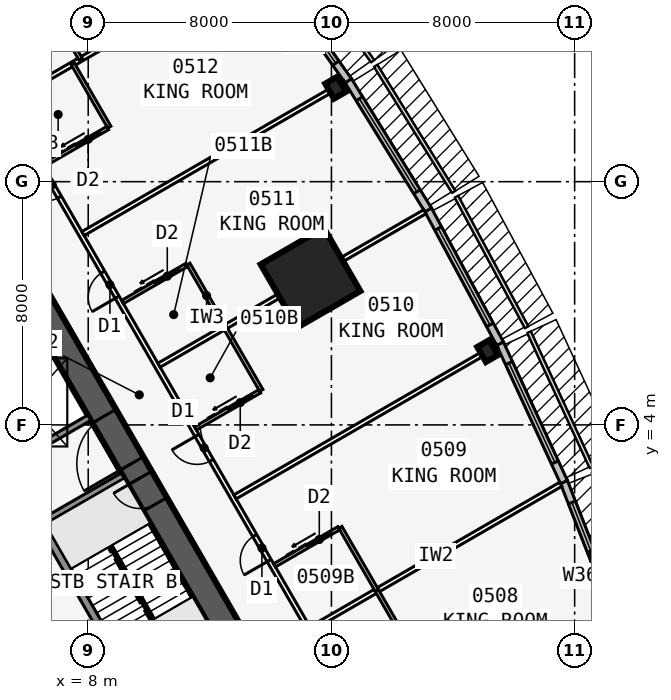
"""IFC4 building model, lengths in metres.
Left out: names, types, materials, properties, quantities, classifications, styles, units other than length and angle.
Written with IfcOpenShell. Run it as: python <this file> out.ifc"""

import sys

from ifc_helpers import new_model, si_unit, direction, frame, frame_2d, origin, origin_2d, place, context, subcontext, project, spatial, rectangle, i_section, extrude, element, fill, save


model = new_model("IFC4")
c1 = context("Model", 3, precision=1e-05, world=origin(), true_north=direction((0.0, 1.0)))
c2 = subcontext(c1, "Body", "Model", "MODEL_VIEW")
j1 = project(units=[si_unit("LENGTHUNIT", "METRE"), si_unit("PLANEANGLEUNIT", "RADIAN")], contexts=[c1])
p1 = place(None, origin())
s1 = spatial("IfcSite", under=j1, at=p1, CompositionType="ELEMENT")
p2 = place(p1, origin())
s2 = spatial("IfcBuilding", under=s1, at=p2, CompositionType="ELEMENT")
p3 = place(p2, frame((0.0, 0.0, 28.5)))
s3 = spatial("IfcBuildingStorey", under=s2, at=p3, CompositionType="ELEMENT", Elevation=28.5)
p4 = place(p3, frame((16.5, -9.526, 0.0), z_axis=(0.0, 0.0, 1.0), x_axis=(-0.499999749417, 0.866025548458, 0.0)))
e1 = element("IfcWall", 1, at=p4, inside=s3, PredefinedType="SHEAR", context=c2, shape_type="SweptSolid", body=[
    extrude(rectangle(XDim=33.0, YDim=0.9, at=frame_2d((16.5, 0.0))), origin(), (0.0, 0.0, 1.0), 3.4),
])
p5 = place(p4, frame((14.15, 0.0, 0.0)))
e2 = element("IfcOpeningElement", 2, at=p5, cuts=e1, PredefinedType="OPENING", context=c2, shape_type="SweptSolid", body=[
    extrude(rectangle(XDim=1.8, YDim=2.13, at=frame_2d((0.9, 1.065))), frame((0.0, 0.46, 0.0), z_axis=(0.0, -1.0, 0.0), x_axis=(1.0, 0.0, 0.0)), (0.0, 0.0, 1.0), 0.92),
])
p6 = place(p4, frame((12.6, 0.0, 0.0)))
e3 = element("IfcOpeningElement", 3, at=p6, cuts=e1, PredefinedType="OPENING", context=c2, shape_type="SweptSolid", body=[
    extrude(rectangle(XDim=1.0, YDim=2.13, at=frame_2d((0.5, 1.065))), frame((0.0, 0.46, 0.0), z_axis=(0.0, -1.0, 0.0), x_axis=(1.0, 0.0, 0.0)), (0.0, 0.0, 1.0), 0.92),
])
p7 = place(p3, frame((10.245, -5.843, 0.0), z_axis=(0.0, 0.0, 1.0), x_axis=(-0.499993009313, 0.866029439822, 0.0)))
e4 = element("IfcWall", 4, at=p7, inside=s3, PredefinedType="SOLIDWALL", context=c2, shape_type="SweptSolid", body=[
    extrude(rectangle(XDim=7.733, YDim=0.25, at=frame_2d((3.866, 0.0))), origin(), (0.0, 0.0, 1.0), 3.235),
])
for number, where, z_axis, x_axis in (
    (5, (6.429, 0.767, 0.0), (0.0, 0.0, 1.0), (0.866, 0.5, 0.0)),
    (6, (5.329, 2.673, 0.0), (0.0, 0.0, 1.0), (0.866, 0.5, 0.0)),
):
    element("IfcWall", number, at=place(p3, frame(where, z_axis=z_axis, x_axis=x_axis)), inside=s3, PredefinedType="SOLIDWALL", context=c2, shape_type="SweptSolid", body=[
        extrude(rectangle(XDim=3.125, YDim=0.2, at=frame_2d((1.562, 0.0))), origin(), (0.0, 0.0, 1.0), 3.235),
    ])
for number, where, z_axis, x_axis in (
    (7, (21.137, 6.43, 0.0), (0.0, 0.0, 1.0), (0.866, 0.5, 0.0)),
    (8, (16.137, 15.09, 0.0), (0.0, 0.0, 1.0), (0.866, 0.5, 0.0)),
):
    element("IfcColumn", number, at=place(p3, frame(where, z_axis=z_axis, x_axis=x_axis)), inside=s3, PredefinedType="COLUMN", context=c2, shape_type="SweptSolid", body=[
        extrude(i_section(OverallWidth=0.455, OverallDepth=0.569, WebThickness=0.078, FlangeThickness=0.125, at=origin_2d()), origin(), (0.0, 0.0, 1.0), 3.4),
    ])
p8 = place(p3, frame((15.312, 8.84, 0.0), z_axis=(0.0, 0.0, 1.0), x_axis=(0.866025403784, 0.5, 0.0)))
e9 = element("IfcColumn", 9, at=p8, inside=s3, PredefinedType="COLUMN", context=c2, shape_type="SweptSolid", body=[
    extrude(rectangle(XDim=2.4, YDim=2.4, at=origin_2d()), origin(), (0.0, 0.0, 1.0), 3.4),
])
p9 = place(p3, frame((25.486, -2.584, 0.0), z_axis=(0.0, 0.0, 1.0), x_axis=(-0.364013463868, 0.931393685894, 0.0)))
e10 = element("IfcWall", 10, at=p9, inside=s3, PredefinedType="STANDARD", context=c2, shape_type="SweptSolid", body=[
    extrude(rectangle(XDim=5.058, YDim=0.25, at=frame_2d((2.529, 0.0))), origin(), (0.0, 0.0, 1.0), 3.235),
])
p10 = place(p9, frame((0.729, 0.0, 0.45)))
e11 = element("IfcOpeningElement", 11, at=p10, cuts=e10, PredefinedType="OPENING", context=c2, shape_type="SweptSolid", body=[
    extrude(rectangle(XDim=3.6, YDim=2.4, at=frame_2d((1.8, 1.2))), frame((0.0, 0.135, 0.0), z_axis=(0.0, -1.0, 0.0), x_axis=(1.0, 0.0, 0.0)), (0.0, 0.0, 1.0), 0.27),
])
p11 = place(p3, frame((23.648, 2.119, 0.0), z_axis=(0.0, 0.0, 1.0), x_axis=(-0.419203100754, 0.907892482796, 0.0)))
e12 = element("IfcWall", 12, at=p11, inside=s3, PredefinedType="STANDARD", context=c2, shape_type="SweptSolid", body=[
    extrude(rectangle(XDim=5.021, YDim=0.25, at=frame_2d((2.51, 0.0))), origin(), (0.0, 0.0, 1.0), 3.235),
])
p12 = place(p11, frame((0.71, 0.0, 0.45)))
e13 = element("IfcOpeningElement", 13, at=p12, cuts=e12, PredefinedType="OPENING", context=c2, shape_type="SweptSolid", body=[
    extrude(rectangle(XDim=3.6, YDim=2.4, at=frame_2d((1.8, 1.2))), frame((0.0, 0.135, 0.0), z_axis=(0.0, -1.0, 0.0), x_axis=(1.0, 0.0, 0.0)), (0.0, 0.0, 1.0), 0.27),
])
p13 = place(p3, frame((21.547, 6.671, 0.0), z_axis=(0.0, 0.0, 1.0), x_axis=(-0.473412820489, 0.880840678782, 0.0)))
e14 = element("IfcWall", 14, at=p13, inside=s3, PredefinedType="STANDARD", context=c2, shape_type="SweptSolid", body=[
    extrude(rectangle(XDim=5.002, YDim=0.25, at=frame_2d((2.501, 0.0))), origin(), (0.0, 0.0, 1.0), 3.235),
])
p14 = place(p13, frame((0.701, 0.0, 0.45)))
e15 = element("IfcOpeningElement", 15, at=p14, cuts=e14, PredefinedType="OPENING", context=c2, shape_type="SweptSolid", body=[
    extrude(rectangle(XDim=3.6, YDim=2.4, at=frame_2d((1.8, 1.2))), frame((0.0, 0.135, 0.0), z_axis=(0.0, -1.0, 0.0), x_axis=(1.0, 0.0, 0.0)), (0.0, 0.0, 1.0), 0.27),
])
p15 = place(p3, frame((19.182, 11.071, 0.0), z_axis=(0.0, 0.0, 1.0), x_axis=(-0.526132807704, 0.850402415717, 0.0)))
e16 = element("IfcWall", 16, at=p15, inside=s3, PredefinedType="STANDARD", context=c2, shape_type="SweptSolid", body=[
    extrude(rectangle(XDim=5.002, YDim=0.25, at=frame_2d((2.501, 0.0))), origin(), (0.0, 0.0, 1.0), 3.235),
])
p16 = place(p15, frame((0.701, 0.0, 0.45)))
e17 = element("IfcOpeningElement", 17, at=p16, cuts=e16, PredefinedType="OPENING", context=c2, shape_type="SweptSolid", body=[
    extrude(rectangle(XDim=3.6, YDim=2.4, at=frame_2d((1.8, 1.2))), frame((0.0, 0.135, 0.0), z_axis=(0.0, -1.0, 0.0), x_axis=(1.0, 0.0, 0.0)), (0.0, 0.0, 1.0), 0.27),
])
p17 = place(p3, frame((16.555, 15.318, 0.0), z_axis=(0.0, 0.0, 1.0), x_axis=(-0.5766431066, 0.81699616132, 0.0)))
e18 = element("IfcWall", 18, at=p17, inside=s3, PredefinedType="STANDARD", context=c2, shape_type="SweptSolid", body=[
    extrude(rectangle(XDim=5.021, YDim=0.25, at=frame_2d((2.51, 0.0))), origin(), (0.0, 0.0, 1.0), 3.235),
])
p18 = place(p17, frame((0.71, 0.0, 0.45)))
e19 = element("IfcOpeningElement", 19, at=p18, cuts=e18, PredefinedType="OPENING", context=c2, shape_type="SweptSolid", body=[
    extrude(rectangle(XDim=3.6, YDim=2.4, at=frame_2d((1.8, 1.2))), frame((0.0, 0.135, 0.0), z_axis=(0.0, -1.0, 0.0), x_axis=(1.0, 0.0, 0.0)), (0.0, 0.0, 1.0), 0.27),
])
p19 = place(p3, frame((20.027, -10.985, 0.0), z_axis=(0.0, 0.0, 1.0), x_axis=(-0.500001677587, 0.866024435227, 0.0)))
e20 = element("IfcWall", 20, at=p19, inside=s3, PredefinedType="PARTITIONING", context=c2, shape_type="SweptSolid", body=[
    extrude(rectangle(XDim=39.054, YDim=0.15, at=frame_2d((19.527, 0.0))), origin(), (0.0, 0.0, 1.0), 3.235),
])
p20 = place(p19, frame((0.352, 0.0, 0.0)))
e21 = element("IfcOpeningElement", 21, at=p20, cuts=e20, PredefinedType="OPENING", context=c2, shape_type="SweptSolid", body=[
    extrude(rectangle(XDim=0.95, YDim=2.13, at=frame_2d((0.475, 1.065))), frame((0.0, 0.085, 0.0), z_axis=(0.0, -1.0, 0.0), x_axis=(1.0, 0.0, 0.0)), (0.0, 0.0, 1.0), 0.17),
])
p21 = place(p19, frame((5.952, 0.0, 0.0)))
e22 = element("IfcOpeningElement", 22, at=p21, cuts=e20, PredefinedType="OPENING", context=c2, shape_type="SweptSolid", body=[
    extrude(rectangle(XDim=0.95, YDim=2.13, at=frame_2d((0.475, 1.065))), frame((0.0, 0.085, 0.0), z_axis=(0.0, -1.0, 0.0), x_axis=(1.0, 0.0, 0.0)), (0.0, 0.0, 1.0), 0.17),
])
p22 = place(p19, frame((12.152, 0.0, 0.0)))
e23 = element("IfcOpeningElement", 23, at=p22, cuts=e20, PredefinedType="OPENING", context=c2, shape_type="SweptSolid", body=[
    extrude(rectangle(XDim=0.95, YDim=2.13, at=frame_2d((0.475, 1.065))), frame((0.0, 0.085, 0.0), z_axis=(0.0, -1.0, 0.0), x_axis=(1.0, 0.0, 0.0)), (0.0, 0.0, 1.0), 0.17),
])
p23 = place(p19, frame((15.952, 0.0, 0.0)))
e24 = element("IfcOpeningElement", 24, at=p23, cuts=e20, PredefinedType="OPENING", context=c2, shape_type="SweptSolid", body=[
    extrude(rectangle(XDim=0.95, YDim=2.13, at=frame_2d((0.475, 1.065))), frame((0.0, 0.085, 0.0), z_axis=(0.0, -1.0, 0.0), x_axis=(1.0, 0.0, 0.0)), (0.0, 0.0, 1.0), 0.17),
])
p24 = place(p19, frame((22.152, 0.0, 0.0)))
e25 = element("IfcOpeningElement", 25, at=p24, cuts=e20, PredefinedType="OPENING", context=c2, shape_type="SweptSolid", body=[
    extrude(rectangle(XDim=0.95, YDim=2.13, at=frame_2d((0.475, 1.065))), frame((0.0, 0.085, 0.0), z_axis=(0.0, -1.0, 0.0), x_axis=(1.0, 0.0, 0.0)), (0.0, 0.0, 1.0), 0.17),
])
p25 = place(p19, frame((25.952, 0.0, 0.0)))
e26 = element("IfcOpeningElement", 26, at=p25, cuts=e20, PredefinedType="OPENING", context=c2, shape_type="SweptSolid", body=[
    extrude(rectangle(XDim=0.95, YDim=2.13, at=frame_2d((0.475, 1.065))), frame((0.0, 0.085, 0.0), z_axis=(0.0, -1.0, 0.0), x_axis=(1.0, 0.0, 0.0)), (0.0, 0.0, 1.0), 0.17),
])
p26 = place(p19, frame((36.546, 0.0, 0.0)))
e27 = element("IfcOpeningElement", 27, at=p26, cuts=e20, PredefinedType="OPENING", context=c2, shape_type="SweptSolid", body=[
    extrude(rectangle(XDim=0.95, YDim=2.13, at=frame_2d((0.475, 1.065))), frame((0.0, 0.085, 0.0), z_axis=(0.0, -1.0, 0.0), x_axis=(1.0, 0.0, 0.0)), (0.0, 0.0, 1.0), 0.17),
])
p27 = place(p3, frame((15.329, -2.697, 0.0), z_axis=(0.0, 0.0, 1.0), x_axis=(0.866018409083, 0.500012114982, 0.0)))
e28 = element("IfcWall", 28, at=p27, inside=s3, PredefinedType="PARTITIONING", context=c2, shape_type="SweptSolid", body=[
    extrude(rectangle(XDim=9.485, YDim=0.15, at=frame_2d((4.742, 0.0))), origin(), (0.0, 0.0, 1.0), 2.389),
])
p28 = place(p3, frame((12.829, 1.633, 0.0), z_axis=(0.0, 0.0, 1.0), x_axis=(0.866026934769, 0.499997348248, 0.0)))
e29 = element("IfcWall", 29, at=p28, inside=s3, PredefinedType="PARTITIONING", context=c2, shape_type="SweptSolid", body=[
    extrude(rectangle(XDim=9.943, YDim=0.15, at=frame_2d((4.971, 0.0))), origin(), (0.0, 0.0, 1.0), 2.389),
])
p29 = place(p3, frame((10.329, 5.963, 0.0), z_axis=(0.0, 0.0, 1.0), x_axis=(0.866021688545, 0.500006434927, 0.0)))
e30 = element("IfcWall", 30, at=p29, inside=s3, PredefinedType="PARTITIONING", context=c2, shape_type="SweptSolid", body=[
    extrude(rectangle(XDim=10.096, YDim=0.15, at=frame_2d((5.048, 0.0))), origin(), (0.0, 0.0, 1.0), 2.389),
])
p30 = place(p3, frame((7.829, 10.293, 0.0), z_axis=(0.0, 0.0, 1.0), x_axis=(0.866016302457, 0.50001576363, 0.0)))
e31 = element("IfcWall", 31, at=p30, inside=s3, PredefinedType="PARTITIONING", context=c2, shape_type="SweptSolid", body=[
    extrude(rectangle(XDim=9.943, YDim=0.15, at=frame_2d((4.972, 0.0))), origin(), (0.0, 0.0, 1.0), 2.389),
])
p31 = place(p3, frame((5.329, 14.623, 0.0), z_axis=(0.0, 0.0, 1.0), x_axis=(0.866018409083, 0.500012114982, 0.0)))
e32 = element("IfcWall", 32, at=p31, inside=s3, PredefinedType="PARTITIONING", context=c2, shape_type="SweptSolid", body=[
    extrude(rectangle(XDim=9.485, YDim=0.15, at=frame_2d((4.742, 0.0))), origin(), (0.0, 0.0, 1.0), 2.389),
])
p32 = place(p3, frame((18.694, -3.526, 0.0), z_axis=(0.0, 0.0, 1.0), x_axis=(-0.500033551112, 0.866006032174, 0.0)))
e33 = element("IfcWall", 33, at=p32, inside=s3, PredefinedType="PLUMBINGWALL", context=c2, shape_type="SweptSolid", body=[
    extrude(rectangle(XDim=2.4, YDim=0.12, at=frame_2d((1.2, 0.0))), origin(), (0.0, 0.0, 1.0), 3.235),
])
p33 = place(p3, frame((17.493, -1.447, 0.0), z_axis=(0.0, 0.0, 1.0), x_axis=(-0.500001309137, 0.866024647952, 0.0)))
e34 = element("IfcWall", 34, at=p33, inside=s3, PredefinedType="PLUMBINGWALL", context=c2, shape_type="SweptSolid", body=[
    extrude(rectangle(XDim=2.4, YDim=0.12, at=frame_2d((1.2, 0.0))), origin(), (0.0, 0.0, 1.0), 3.235),
])
p34 = place(p3, frame((14.128, -0.619, 0.0), z_axis=(0.0, 0.0, 1.0), x_axis=(0.866048967903, 0.499959183527, 0.0)))
e35 = element("IfcWall", 35, at=p34, inside=s3, PredefinedType="PLUMBINGWALL", context=c2, shape_type="SweptSolid", body=[
    extrude(rectangle(XDim=2.44, YDim=0.12, at=frame_2d((1.22, 0.0))), origin(), (0.0, 0.0, 1.0), 3.235),
])
p35 = place(p34, frame((1.25, 0.0, 0.0)))
e36 = element("IfcOpeningElement", 36, at=p35, cuts=e35, PredefinedType="OPENING", context=c2, shape_type="SweptSolid", body=[
    extrude(rectangle(XDim=0.9, YDim=2.13, at=frame_2d((0.45, 1.065))), frame((0.0, 0.07, 0.0), z_axis=(0.0, -1.0, 0.0), x_axis=(1.0, 0.0, 0.0)), (0.0, 0.0, 1.0), 0.14),
])
p36 = place(p3, frame((13.694, 5.135, 0.0), z_axis=(0.0, 0.0, 1.0), x_axis=(-0.500077600433, 0.865980596518, 0.0)))
e37 = element("IfcWall", 37, at=p36, inside=s3, PredefinedType="PLUMBINGWALL", context=c2, shape_type="SweptSolid", body=[
    extrude(rectangle(XDim=2.4, YDim=0.12, at=frame_2d((1.2, 0.0))), origin(), (0.0, 0.0, 1.0), 3.235),
])
p37 = place(p3, frame((11.529, 3.885, 0.0), z_axis=(0.0, 0.0, 1.0), x_axis=(0.866023955769, 0.500002508028, 0.0)))
e38 = element("IfcWall", 38, at=p37, inside=s3, PredefinedType="PLUMBINGWALL", context=c2, shape_type="SweptSolid", body=[
    extrude(rectangle(XDim=2.44, YDim=0.12, at=frame_2d((1.22, 0.0))), origin(), (0.0, 0.0, 1.0), 3.235),
])
p38 = place(p37, frame((1.25, 0.0, 0.0)))
e39 = element("IfcOpeningElement", 39, at=p38, cuts=e38, PredefinedType="OPENING", context=c2, shape_type="SweptSolid", body=[
    extrude(rectangle(XDim=0.9, YDim=2.13, at=frame_2d((0.45, 1.065))), frame((0.0, 0.07, 0.0), z_axis=(0.0, -1.0, 0.0), x_axis=(1.0, 0.0, 0.0)), (0.0, 0.0, 1.0), 0.14),
])
p39 = place(p3, frame((12.493, 7.213, 0.0), z_axis=(0.0, 0.0, 1.0), x_axis=(-0.500001309137, 0.866024647952, 0.0)))
e40 = element("IfcWall", 40, at=p39, inside=s3, PredefinedType="PLUMBINGWALL", context=c2, shape_type="SweptSolid", body=[
    extrude(rectangle(XDim=2.4, YDim=0.12, at=frame_2d((1.2, 0.0))), origin(), (0.0, 0.0, 1.0), 3.235),
])
p40 = place(p3, frame((9.128, 8.042, 0.0), z_axis=(0.0, 0.0, 1.0), x_axis=(0.866005645448, 0.500034220881, 0.0)))
e41 = element("IfcWall", 41, at=p40, inside=s3, PredefinedType="PLUMBINGWALL", context=c2, shape_type="SweptSolid", body=[
    extrude(rectangle(XDim=2.44, YDim=0.12, at=frame_2d((1.22, 0.0))), origin(), (0.0, 0.0, 1.0), 3.235),
])
p41 = place(p40, frame((1.25, 0.0, 0.0)))
e42 = element("IfcOpeningElement", 42, at=p41, cuts=e41, PredefinedType="OPENING", context=c2, shape_type="SweptSolid", body=[
    extrude(rectangle(XDim=0.9, YDim=2.13, at=frame_2d((0.45, 1.065))), frame((0.0, 0.07, 0.0), z_axis=(0.0, -1.0, 0.0), x_axis=(1.0, 0.0, 0.0)), (0.0, 0.0, 1.0), 0.14),
])
p42 = place(p3, frame((8.694, 13.795, 0.0), z_axis=(0.0, 0.0, 1.0), x_axis=(-0.500077600433, 0.865980596518, 0.0)))
e43 = element("IfcWall", 43, at=p42, inside=s3, PredefinedType="PLUMBINGWALL", context=c2, shape_type="SweptSolid", body=[
    extrude(rectangle(XDim=2.4, YDim=0.12, at=frame_2d((1.2, 0.0))), origin(), (0.0, 0.0, 1.0), 3.235),
])
p43 = place(p3, frame((6.529, 12.545, 0.0), z_axis=(0.0, 0.0, 1.0), x_axis=(0.866023955769, 0.500002508028, 0.0)))
e44 = element("IfcWall", 44, at=p43, inside=s3, PredefinedType="PLUMBINGWALL", context=c2, shape_type="SweptSolid", body=[
    extrude(rectangle(XDim=2.44, YDim=0.12, at=frame_2d((1.22, 0.0))), origin(), (0.0, 0.0, 1.0), 3.235),
])
p44 = place(p43, frame((1.25, 0.0, 0.0)))
e45 = element("IfcOpeningElement", 45, at=p44, cuts=e44, PredefinedType="OPENING", context=c2, shape_type="SweptSolid", body=[
    extrude(rectangle(XDim=0.9, YDim=2.13, at=frame_2d((0.45, 1.065))), frame((0.0, 0.07, 0.0), z_axis=(0.0, -1.0, 0.0), x_axis=(1.0, 0.0, 0.0)), (0.0, 0.0, 1.0), 0.14),
])
p45 = place(p3, frame((7.753, 16.023, 0.0), z_axis=(0.0, 0.0, 1.0), x_axis=(-0.499990139034, 0.866031096941, 0.0)))
e46 = element("IfcWall", 46, at=p45, inside=s3, PredefinedType="PLUMBINGWALL", context=c2, shape_type="SweptSolid", body=[
    extrude(rectangle(XDim=3.0, YDim=0.12, at=frame_2d((1.5, 0.0))), origin(), (0.0, 0.0, 1.0), 3.235),
])
p46 = place(p3, frame((10.135, -2.401, 0.0), z_axis=(0.0, 0.0, 1.0), x_axis=(-0.499992232847, 0.866029888106, 0.0)))
e47 = element("IfcWall", 47, at=p46, inside=s3, PredefinedType="SOLIDWALL", context=c2, shape_type="SweptSolid", body=[
    extrude(rectangle(XDim=2.794, YDim=0.1, at=frame_2d((1.397, 0.0))), origin(), (0.0, 0.0, 1.0), 3.4),
])
p47 = place(p10, origin())
e48 = element("IfcWindow", 48, at=p47, inside=s3, PartitioningType="SINGLE_PANEL", PredefinedType="WINDOW", context=c2, shape_type="SweptSolid", body=[
    extrude(rectangle(XDim=3.6, YDim=2.4, at=frame_2d((1.8, 1.2))), frame((0.0, 0.03, 0.0), z_axis=(0.0, -1.0, 0.0), x_axis=(1.0, 0.0, 0.0)), (0.0, 0.0, 1.0), 0.06),
])
fill(e11, e48)
p48 = place(p12, origin())
e49 = element("IfcWindow", 49, at=p48, inside=s3, PartitioningType="SINGLE_PANEL", PredefinedType="WINDOW", context=c2, shape_type="SweptSolid", body=[
    extrude(rectangle(XDim=3.6, YDim=2.4, at=frame_2d((1.8, 1.2))), frame((0.0, 0.03, 0.0), z_axis=(0.0, -1.0, 0.0), x_axis=(1.0, 0.0, 0.0)), (0.0, 0.0, 1.0), 0.06),
])
fill(e13, e49)
p49 = place(p14, origin())
e50 = element("IfcWindow", 50, at=p49, inside=s3, PartitioningType="SINGLE_PANEL", PredefinedType="WINDOW", context=c2, shape_type="SweptSolid", body=[
    extrude(rectangle(XDim=3.6, YDim=2.4, at=frame_2d((1.8, 1.2))), frame((0.0, 0.03, 0.0), z_axis=(0.0, -1.0, 0.0), x_axis=(1.0, 0.0, 0.0)), (0.0, 0.0, 1.0), 0.06),
])
fill(e15, e50)
p50 = place(p16, origin())
e51 = element("IfcWindow", 51, at=p50, inside=s3, PartitioningType="SINGLE_PANEL", PredefinedType="WINDOW", context=c2, shape_type="SweptSolid", body=[
    extrude(rectangle(XDim=3.6, YDim=2.4, at=frame_2d((1.8, 1.2))), frame((0.0, 0.03, 0.0), z_axis=(0.0, -1.0, 0.0), x_axis=(1.0, 0.0, 0.0)), (0.0, 0.0, 1.0), 0.06),
])
fill(e17, e51)
p51 = place(p18, origin())
e52 = element("IfcWindow", 52, at=p51, inside=s3, PartitioningType="SINGLE_PANEL", PredefinedType="WINDOW", context=c2, shape_type="SweptSolid", body=[
    extrude(rectangle(XDim=3.6, YDim=2.4, at=frame_2d((1.8, 1.2))), frame((0.0, 0.03, 0.0), z_axis=(0.0, -1.0, 0.0), x_axis=(1.0, 0.0, 0.0)), (0.0, 0.0, 1.0), 0.06),
])
fill(e19, e52)
p52 = place(p35, origin())
e53 = element("IfcDoor", 53, at=p52, inside=s3, OperationType="SLIDING_TO_LEFT", PredefinedType="DOOR", context=c2, shape_type="SweptSolid", body=[
    extrude(rectangle(XDim=0.9, YDim=2.13, at=frame_2d((0.45, 1.065))), frame((0.0, 0.025, 0.0), z_axis=(0.0, -1.0, 0.0), x_axis=(1.0, 0.0, 0.0)), (0.0, 0.0, 1.0), 0.05),
])
fill(e36, e53)
p53 = place(p22, origin())
e54 = element("IfcDoor", 54, at=p53, inside=s3, OperationType="SINGLE_SWING_LEFT", PredefinedType="DOOR", context=c2, shape_type="SweptSolid", body=[
    extrude(rectangle(XDim=0.95, YDim=2.13, at=frame_2d((0.475, 1.065))), frame((0.0, 0.025, 0.0), z_axis=(0.0, -1.0, 0.0), x_axis=(1.0, 0.0, 0.0)), (0.0, 0.0, 1.0), 0.05),
])
fill(e23, e54)
p54 = place(p38, origin())
e55 = element("IfcDoor", 55, at=p54, inside=s3, OperationType="SLIDING_TO_LEFT", PredefinedType="DOOR", context=c2, shape_type="SweptSolid", body=[
    extrude(rectangle(XDim=0.9, YDim=2.13, at=frame_2d((0.45, 1.065))), frame((0.0, 0.025, 0.0), z_axis=(0.0, -1.0, 0.0), x_axis=(1.0, 0.0, 0.0)), (0.0, 0.0, 1.0), 0.05),
])
fill(e39, e55)
p55 = place(p23, origin())
e56 = element("IfcDoor", 56, at=p55, inside=s3, OperationType="SINGLE_SWING_RIGHT", PredefinedType="DOOR", context=c2, shape_type="SweptSolid", body=[
    extrude(rectangle(XDim=0.95, YDim=2.13, at=frame_2d((0.475, 1.065))), frame((0.0, 0.025, 0.0), z_axis=(0.0, -1.0, 0.0), x_axis=(1.0, 0.0, 0.0)), (0.0, 0.0, 1.0), 0.05),
])
fill(e24, e56)
p56 = place(p41, origin())
e57 = element("IfcDoor", 57, at=p56, inside=s3, OperationType="SLIDING_TO_LEFT", PredefinedType="DOOR", context=c2, shape_type="SweptSolid", body=[
    extrude(rectangle(XDim=0.9, YDim=2.13, at=frame_2d((0.45, 1.065))), frame((0.0, 0.025, 0.0), z_axis=(0.0, -1.0, 0.0), x_axis=(1.0, 0.0, 0.0)), (0.0, 0.0, 1.0), 0.05),
])
fill(e42, e57)
p57 = place(p24, origin())
e58 = element("IfcDoor", 58, at=p57, inside=s3, OperationType="SINGLE_SWING_LEFT", PredefinedType="DOOR", context=c2, shape_type="SweptSolid", body=[
    extrude(rectangle(XDim=0.95, YDim=2.13, at=frame_2d((0.475, 1.065))), frame((0.0, 0.025, 0.0), z_axis=(0.0, -1.0, 0.0), x_axis=(1.0, 0.0, 0.0)), (0.0, 0.0, 1.0), 0.05),
])
fill(e25, e58)
p58 = place(p44, origin())
e59 = element("IfcDoor", 59, at=p58, inside=s3, OperationType="SLIDING_TO_LEFT", PredefinedType="DOOR", context=c2, shape_type="SweptSolid", body=[
    extrude(rectangle(XDim=0.9, YDim=2.13, at=frame_2d((0.45, 1.065))), frame((0.0, 0.025, 0.0), z_axis=(0.0, -1.0, 0.0), x_axis=(1.0, 0.0, 0.0)), (0.0, 0.0, 1.0), 0.05),
])
fill(e45, e59)
p59 = place(p25, origin())
e60 = element("IfcDoor", 60, at=p59, inside=s3, OperationType="SINGLE_SWING_RIGHT", PredefinedType="DOOR", context=c2, shape_type="SweptSolid", body=[
    extrude(rectangle(XDim=0.95, YDim=2.13, at=frame_2d((0.475, 1.065))), frame((0.0, 0.025, 0.0), z_axis=(0.0, -1.0, 0.0), x_axis=(1.0, 0.0, 0.0)), (0.0, 0.0, 1.0), 0.05),
])
fill(e26, e60)
p60 = place(p5, origin())
e61 = element("IfcDoor", 61, at=p60, inside=s3, OperationType="DOUBLE_DOOR_SINGLE_SWING", PredefinedType="DOOR", context=c2, shape_type="SweptSolid", body=[
    extrude(rectangle(XDim=1.8, YDim=2.13, at=frame_2d((0.9, 1.065))), frame((0.0, 0.025, 0.0), z_axis=(0.0, -1.0, 0.0), x_axis=(1.0, 0.0, 0.0)), (0.0, 0.0, 1.0), 0.05),
])
fill(e2, e61)
p61 = place(p6, origin())
e62 = element("IfcDoor", 62, at=p61, inside=s3, OperationType="SINGLE_SWING_RIGHT", PredefinedType="DOOR", context=c2, shape_type="SweptSolid", body=[
    extrude(rectangle(XDim=1.0, YDim=2.13, at=frame_2d((0.5, 1.065))), frame((0.0, 0.025, 0.0), z_axis=(0.0, -1.0, 0.0), x_axis=(1.0, 0.0, 0.0)), (0.0, 0.0, 1.0), 0.05),
])
fill(e3, e62)
save(model, sys.argv[1])
